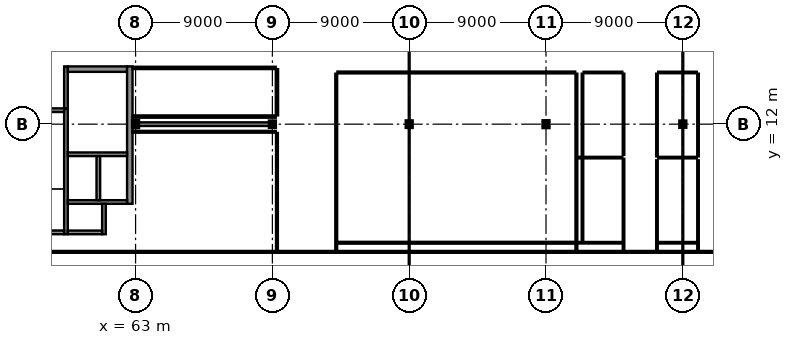
"""IFC4 building model, lengths in metres.
Left out: names, types, materials, properties, quantities, classifications, styles, units other than length and angle.
Written with IfcOpenShell. Run it as: python <this file> out.ifc"""

import sys

from ifc_helpers import new_model, si_unit, direction, frame, frame_2d, origin, origin_2d, place, context, subcontext, project, spatial, rectangle, i_section, extrude, element, fill, save


model = new_model("IFC4")
c1 = context("Model", 3, precision=1e-05, world=origin(), true_north=direction((0.0, 1.0)))
c2 = subcontext(c1, "Body", "Model", "MODEL_VIEW")
j1 = project(units=[si_unit("LENGTHUNIT", "METRE"), si_unit("PLANEANGLEUNIT", "RADIAN")], contexts=[c1])
p1 = place(None, origin())
s1 = spatial("IfcSite", under=j1, at=p1, CompositionType="ELEMENT")
p2 = place(p1, origin())
s2 = spatial("IfcBuilding", under=s1, at=p2, CompositionType="ELEMENT")
p3 = place(p2, frame((0.0, 0.0, 18.9)))
s3 = spatial("IfcBuildingStorey", under=s2, at=p3, CompositionType="ELEMENT", Elevation=18.9)
p4 = place(p3, frame((63.0, 12.0, 0.0), z_axis=(0.0, 0.0, 1.0), x_axis=(1.0, 0.0, 0.0)))
e1 = element("IfcColumn", 1, at=p4, inside=s3, PredefinedType="COLUMN", context=c2, shape_type="SweptSolid", body=[
    extrude(i_section(OverallWidth=0.3, OverallDepth=0.36, WebThickness=0.012, FlangeThickness=0.022, at=origin_2d()), origin(), (0.0, 0.0, 1.0), 4.5),
])
p5 = place(p3, frame((72.0, 12.0, 0.0), z_axis=(0.0, 0.0, 1.0), x_axis=(0.0, 1.0, 0.0)))
e2 = element("IfcColumn", 2, at=p5, inside=s3, PredefinedType="COLUMN", context=c2, shape_type="SweptSolid", body=[
    extrude(i_section(OverallWidth=0.3, OverallDepth=0.32, WebThickness=0.011, FlangeThickness=0.021, at=origin_2d()), origin(), (0.0, 0.0, 1.0), 4.5),
])
p6 = place(p3, frame((81.0, 12.0, 0.0), z_axis=(0.0, 0.0, 1.0), x_axis=(1.0, 0.0, 0.0)))
e3 = element("IfcColumn", 3, at=p6, inside=s3, PredefinedType="COLUMN", context=c2, shape_type="SweptSolid", body=[
    extrude(i_section(OverallWidth=0.3, OverallDepth=0.34, WebThickness=0.012, FlangeThickness=0.021, at=origin_2d()), origin(), (0.0, 0.0, 1.0), 4.5),
])
p7 = place(p3, frame((90.0, 12.0, 0.0), z_axis=(0.0, 0.0, 1.0), x_axis=(1.0, 0.0, 0.0)))
e4 = element("IfcColumn", 4, at=p7, inside=s3, PredefinedType="COLUMN", context=c2, shape_type="SweptSolid", body=[
    extrude(i_section(OverallWidth=0.3, OverallDepth=0.36, WebThickness=0.012, FlangeThickness=0.022, at=origin_2d()), origin(), (0.0, 0.0, 1.0), 4.5),
])
p8 = place(p3, frame((99.0, 12.0, 0.0), z_axis=(0.0, 0.0, 1.0), x_axis=(1.0, 0.0, 0.0)))
e5 = element("IfcColumn", 5, at=p8, inside=s3, PredefinedType="COLUMN", context=c2, shape_type="SweptSolid", body=[
    extrude(i_section(OverallWidth=0.3, OverallDepth=0.32, WebThickness=0.011, FlangeThickness=0.021, at=origin_2d()), origin(), (0.0, 0.0, 1.0), 4.5),
])
p9 = place(p3, frame((58.42, 4.76, 0.0), z_axis=(0.0, 0.0, 1.0), x_axis=(0.0, 1.0, 0.0)))
e6 = element("IfcWall", 6, at=p9, inside=s3, PredefinedType="SHEAR", context=c2, shape_type="SweptSolid", body=[
    extrude(rectangle(XDim=8.28, YDim=0.24, at=frame_2d((4.14, 0.0))), origin(), (0.0, 0.0, 1.0), 4.31),
])
p10 = place(p9, frame((6.49, 0.0, 0.0)))
e7 = element("IfcOpeningElement", 7, at=p10, cuts=e6, PredefinedType="OPENING", context=c2, shape_type="SweptSolid", body=[
    extrude(rectangle(XDim=1.3, YDim=2.2, at=frame_2d((0.65, 1.1))), frame((0.0, 0.135, 0.0), z_axis=(0.0, -1.0, 0.0), x_axis=(1.0, 0.0, 0.0)), (0.0, 0.0, 1.0), 0.27),
])
for number, where, z_axis, x_axis in (
    (8, (54.6, 4.88, 0.0), (0.0, 0.0, 1.0), (1.0, 0.0, 0.0)),
    (9, (54.6, 12.92, 0.0), (0.0, 0.0, 1.0), (1.0, 0.0, 0.0)),
):
    element("IfcWall", number, at=place(p3, frame(where, z_axis=z_axis, x_axis=x_axis)), inside=s3, PredefinedType="SHEAR", context=c2, shape_type="SweptSolid", body=[
        extrude(rectangle(XDim=3.7, YDim=0.24, at=frame_2d((1.85, 0.0))), origin(), (0.0, 0.0, 1.0), 4.31),
    ])
p11 = place(p3, frame((58.42, 13.04, 0.0), z_axis=(0.0, 0.0, 1.0), x_axis=(0.0, 1.0, 0.0)))
e10 = element("IfcWall", 10, at=p11, inside=s3, PredefinedType="SHEAR", context=c2, shape_type="SweptSolid", body=[
    extrude(rectangle(XDim=2.76, YDim=0.24, at=frame_2d((1.38, 0.0))), origin(), (0.0, 0.0, 1.0), 4.16),
])
p12 = place(p3, frame((58.54, 15.62, 0.0), z_axis=(0.0, 0.0, 1.0), x_axis=(1.0, 0.0, 0.0)))
e11 = element("IfcWall", 11, at=p12, inside=s3, PredefinedType="SHEAR", context=c2, shape_type="SweptSolid", body=[
    extrude(rectangle(XDim=3.9, YDim=0.36, at=frame_2d((1.95, 0.0))), origin(), (0.0, 0.0, 1.0), 4.16),
])
p13 = place(p12, frame((1.15, 0.0, 0.0)))
e12 = element("IfcOpeningElement", 12, at=p13, cuts=e11, PredefinedType="OPENING", context=c2, shape_type="SweptSolid", body=[
    extrude(rectangle(XDim=1.6, YDim=2.25, at=frame_2d((0.8, 1.125))), frame((0.0, 0.195, 0.0), z_axis=(0.0, -1.0, 0.0), x_axis=(1.0, 0.0, 0.0)), (0.0, 0.0, 1.0), 0.39),
])
p14 = place(p3, frame((62.62, 6.76, 0.0), z_axis=(0.0, 0.0, 1.0), x_axis=(0.0, 1.0, 0.0)))
e13 = element("IfcWall", 13, at=p14, inside=s3, PredefinedType="SHEAR", context=c2, shape_type="SweptSolid", body=[
    extrude(rectangle(XDim=9.04, YDim=0.36, at=frame_2d((4.52, 0.0))), origin(), (0.0, 0.0, 1.0), 4.16),
])
p15 = place(p3, frame((58.54, 10.02, 0.0), z_axis=(0.0, 0.0, 1.0), x_axis=(1.0, 0.0, 0.0)))
e14 = element("IfcWall", 14, at=p15, inside=s3, PredefinedType="SHEAR", context=c2, shape_type="SweptSolid", body=[
    extrude(rectangle(XDim=3.9, YDim=0.24, at=frame_2d((1.95, 0.0))), origin(), (0.0, 0.0, 1.0), 4.31),
])
p16 = place(p15, frame((0.235, 0.0, 0.0)))
e15 = element("IfcOpeningElement", 15, at=p16, cuts=e14, PredefinedType="OPENING", context=c2, shape_type="SweptSolid", body=[
    extrude(rectangle(XDim=1.6, YDim=2.3, at=frame_2d((0.8, 1.15))), frame((0.0, 0.135, 0.0), z_axis=(0.0, -1.0, 0.0), x_axis=(1.0, 0.0, 0.0)), (0.0, 0.0, 1.0), 0.27),
])
p17 = place(p15, frame((2.185, 0.0, 0.0)))
e16 = element("IfcOpeningElement", 16, at=p17, cuts=e14, PredefinedType="OPENING", context=c2, shape_type="SweptSolid", body=[
    extrude(rectangle(XDim=1.6, YDim=2.3, at=frame_2d((0.8, 1.15))), frame((0.0, 0.135, 0.0), z_axis=(0.0, -1.0, 0.0), x_axis=(1.0, 0.0, 0.0)), (0.0, 0.0, 1.0), 0.27),
])
p18 = place(p3, frame((58.54, 6.88, 0.0), z_axis=(0.0, 0.0, 1.0), x_axis=(1.0, 0.0, 0.0)))
e17 = element("IfcWall", 17, at=p18, inside=s3, PredefinedType="SHEAR", context=c2, shape_type="SweptSolid", body=[
    extrude(rectangle(XDim=3.9, YDim=0.24, at=frame_2d((1.95, 0.0))), origin(), (0.0, 0.0, 1.0), 4.31),
])
p19 = place(p3, frame((60.55, 7.0, 0.0), z_axis=(0.0, 0.0, 1.0), x_axis=(0.0, 1.0, 0.0)))
e18 = element("IfcWall", 18, at=p19, inside=s3, PredefinedType="SHEAR", context=c2, shape_type="SweptSolid", body=[
    extrude(rectangle(XDim=2.9, YDim=0.24, at=frame_2d((1.45, 0.0))), origin(), (0.0, 0.0, 1.0), 4.31),
])
p20 = place(p3, frame((60.92, 4.76, 0.0), z_axis=(0.0, 0.0, 1.0), x_axis=(0.0, 1.0, 0.0)))
e19 = element("IfcWall", 19, at=p20, inside=s3, PredefinedType="SHEAR", context=c2, shape_type="SweptSolid", body=[
    extrude(rectangle(XDim=2.0, YDim=0.24, at=frame_2d((1.0, 0.0))), origin(), (0.0, 0.0, 1.0), 4.31),
])
p21 = place(p3, frame((58.54, 4.88, 0.0), z_axis=(0.0, 0.0, 1.0), x_axis=(1.0, 0.0, 0.0)))
e20 = element("IfcWall", 20, at=p21, inside=s3, PredefinedType="SHEAR", context=c2, shape_type="SweptSolid", body=[
    extrude(rectangle(XDim=2.26, YDim=0.24, at=frame_2d((1.13, 0.0))), origin(), (0.0, 0.0, 1.0), 4.31),
])
p22 = place(p3, frame((63.008, 12.0, 0.0), z_axis=(0.0, 0.0, 1.0), x_axis=(1.0, 0.0, 0.0)))
e21 = element("IfcWall", 21, at=p22, inside=s3, PredefinedType="SHEAR", context=c2, shape_type="SweptSolid", body=[
    extrude(rectangle(XDim=8.834, YDim=0.24, at=frame_2d((4.417, 0.0))), origin(), (0.0, 0.0, 1.0), 3.355),
])
p23 = place(p3, frame((53.87, 3.6, 0.0), z_axis=(0.0, 0.0, 1.0), x_axis=(1.0, 0.0, 0.0)))
e22 = element("IfcWall", 22, at=p23, inside=s3, PredefinedType="PARTITIONING", context=c2, shape_type="SweptSolid", body=[
    extrude(rectangle(XDim=63.25, YDim=0.12, at=frame_2d((31.625, 0.0))), origin(), (0.0, 0.0, 1.0), 4.14),
])
p24 = place(p23, frame((19.855, 0.0, 0.0)))
e23 = element("IfcOpeningElement", 23, at=p24, cuts=e22, PredefinedType="OPENING", context=c2, shape_type="SweptSolid", body=[
    extrude(rectangle(XDim=0.95, YDim=2.15, at=frame_2d((0.475, 1.075))), frame((0.0, 0.075, 0.0), z_axis=(0.0, -1.0, 0.0), x_axis=(1.0, 0.0, 0.0)), (0.0, 0.0, 1.0), 0.15),
])
p25 = place(p3, frame((72.3, 11.42, 0.0), z_axis=(0.0, 0.0, 1.0), x_axis=(0.0, -1.0, 0.0)))
e24 = element("IfcWall", 24, at=p25, inside=s3, PredefinedType="PARTITIONING", context=c2, shape_type="SweptSolid", body=[
    extrude(rectangle(XDim=7.765, YDim=0.12, at=frame_2d((3.882, 0.0))), origin(), (0.0, 0.0, 1.0), 4.14),
])
p26 = place(p25, frame((3.433, 0.0, 0.0)))
e25 = element("IfcOpeningElement", 25, at=p26, cuts=e24, PredefinedType="OPENING", context=c2, shape_type="SweptSolid", body=[
    extrude(rectangle(XDim=0.9, YDim=2.1, at=frame_2d((0.45, 1.05))), frame((0.0, 0.075, 0.0), z_axis=(0.0, -1.0, 0.0), x_axis=(1.0, 0.0, 0.0)), (0.0, 0.0, 1.0), 0.15),
])
p27 = place(p3, frame((62.795, 11.5, 0.0), z_axis=(0.0, 0.0, 1.0), x_axis=(1.0, 0.0, 0.0)))
e26 = element("IfcWall", 26, at=p27, inside=s3, PredefinedType="PARTITIONING", context=c2, shape_type="SweptSolid", body=[
    extrude(rectangle(XDim=9.425, YDim=0.12, at=frame_2d((4.712, 0.0))), origin(), (0.0, 0.0, 1.0), 4.14),
])
p28 = place(p3, frame((62.795, 15.7, 0.0), z_axis=(0.0, 0.0, 1.0), x_axis=(1.0, 0.0, 0.0)))
e27 = element("IfcWall", 27, at=p28, inside=s3, PredefinedType="PARTITIONING", context=c2, shape_type="SweptSolid", body=[
    extrude(rectangle(XDim=9.425, YDim=0.15, at=frame_2d((4.712, 0.0))), origin(), (0.0, 0.0, 1.0), 4.14),
])
p29 = place(p28, frame((4.187, 0.0, 0.0)))
e28 = element("IfcOpeningElement", 28, at=p29, cuts=e27, PredefinedType="OPENING", context=c2, shape_type="SweptSolid", body=[
    extrude(rectangle(XDim=1.05, YDim=2.25, at=frame_2d((0.525, 1.125))), frame((0.0, 0.09, 0.0), z_axis=(0.0, -1.0, 0.0), x_axis=(1.0, 0.0, 0.0)), (0.0, 0.0, 1.0), 0.18),
])
p30 = place(p3, frame((72.3, 15.62, 0.0), z_axis=(0.0, 0.0, 1.0), x_axis=(0.0, -1.0, 0.0)))
e29 = element("IfcWall", 29, at=p30, inside=s3, PredefinedType="PARTITIONING", context=c2, shape_type="SweptSolid", body=[
    extrude(rectangle(XDim=3.04, YDim=0.15, at=frame_2d((1.52, 0.0))), origin(), (0.0, 0.0, 1.0), 4.14),
])
p31 = place(p3, frame((72.22, 12.5, 0.0), z_axis=(0.0, 0.0, 1.0), x_axis=(-1.0, 0.0, 0.0)))
e30 = element("IfcWall", 30, at=p31, inside=s3, PredefinedType="PARTITIONING", context=c2, shape_type="SweptSolid", body=[
    extrude(rectangle(XDim=9.425, YDim=0.15, at=frame_2d((4.712, 0.0))), origin(), (0.0, 0.0, 1.0), 4.14),
])
p32 = place(p3, frame((76.2, 3.655, 0.0), z_axis=(0.0, 0.0, 1.0), x_axis=(0.0, 1.0, 0.0)))
e31 = element("IfcWall", 31, at=p32, inside=s3, PredefinedType="PARTITIONING", context=c2, shape_type="SweptSolid", body=[
    extrude(rectangle(XDim=11.665, YDim=0.12, at=frame_2d((5.833, 0.0))), origin(), (0.0, 0.0, 1.0), 4.14),
])
p33 = place(p3, frame((76.28, 15.4, 0.0), z_axis=(0.0, 0.0, 1.0), x_axis=(1.0, 0.0, 0.0)))
e32 = element("IfcWall", 32, at=p33, inside=s3, PredefinedType="PARTITIONING", context=c2, shape_type="SweptSolid", body=[
    extrude(rectangle(XDim=15.64, YDim=0.12, at=frame_2d((7.82, 0.0))), origin(), (0.0, 0.0, 1.0), 4.14),
])
p34 = place(p33, frame((7.345, 0.0, 0.0)))
e33 = element("IfcOpeningElement", 33, at=p34, cuts=e32, PredefinedType="OPENING", context=c2, shape_type="SweptSolid", body=[
    extrude(rectangle(XDim=0.95, YDim=2.15, at=frame_2d((0.475, 1.075))), frame((0.0, 0.075, 0.0), z_axis=(0.0, -1.0, 0.0), x_axis=(1.0, 0.0, 0.0)), (0.0, 0.0, 1.0), 0.15),
])
p35 = place(p3, frame((92.0, 15.32, 0.0), z_axis=(0.0, 0.0, 1.0), x_axis=(0.0, -1.0, 0.0)))
e34 = element("IfcWall", 34, at=p35, inside=s3, PredefinedType="PARTITIONING", context=c2, shape_type="SweptSolid", body=[
    extrude(rectangle(XDim=11.665, YDim=0.12, at=frame_2d((5.833, 0.0))), origin(), (0.0, 0.0, 1.0), 4.14),
])
p36 = place(p3, frame((91.945, 4.2, 0.0), z_axis=(0.0, 0.0, 1.0), x_axis=(-1.0, 0.0, 0.0)))
e35 = element("IfcWall", 35, at=p36, inside=s3, PredefinedType="PARTITIONING", context=c2, shape_type="SweptSolid", body=[
    extrude(rectangle(XDim=15.69, YDim=0.12, at=frame_2d((7.845, 0.0))), origin(), (0.0, 0.0, 1.0), 4.14),
])
p37 = place(p3, frame((92.055, 9.8, 0.0), z_axis=(0.0, 0.0, 1.0), x_axis=(1.0, 0.0, 0.0)))
e36 = element("IfcWall", 36, at=p37, inside=s3, PredefinedType="PARTITIONING", context=c2, shape_type="SweptSolid", body=[
    extrude(rectangle(XDim=2.965, YDim=0.1, at=frame_2d((1.482, 0.0))), origin(), (0.0, 0.0, 1.0), 4.14),
])
p38 = place(p3, frame((95.1, 9.72, 0.0), z_axis=(0.0, 0.0, 1.0), x_axis=(0.0, -1.0, 0.0)))
e37 = element("IfcWall", 37, at=p38, inside=s3, PredefinedType="PARTITIONING", context=c2, shape_type="SweptSolid", body=[
    extrude(rectangle(XDim=6.065, YDim=0.1, at=frame_2d((3.032, 0.0))), origin(), (0.0, 0.0, 1.0), 4.14),
])
p39 = place(p38, frame((2.529, 0.0, 0.0)))
e38 = element("IfcOpeningElement", 38, at=p39, cuts=e37, PredefinedType="OPENING", context=c2, shape_type="SweptSolid", body=[
    extrude(rectangle(XDim=0.9, YDim=2.05, at=frame_2d((0.45, 1.025))), frame((0.0, 0.065, 0.0), z_axis=(0.0, -1.0, 0.0), x_axis=(1.0, 0.0, 0.0)), (0.0, 0.0, 1.0), 0.13),
])
p40 = place(p3, frame((95.055, 4.2, 0.0), z_axis=(0.0, 0.0, 1.0), x_axis=(-1.0, 0.0, 0.0)))
e39 = element("IfcWall", 39, at=p40, inside=s3, PredefinedType="PARTITIONING", context=c2, shape_type="SweptSolid", body=[
    extrude(rectangle(XDim=3.0, YDim=0.1, at=frame_2d((1.5, 0.0))), origin(), (0.0, 0.0, 1.0), 4.14),
])
p41 = place(p3, frame((92.4, 4.245, 0.0), z_axis=(0.0, 0.0, 1.0), x_axis=(0.0, 1.0, 0.0)))
e40 = element("IfcWall", 40, at=p41, inside=s3, PredefinedType="PARTITIONING", context=c2, shape_type="SweptSolid", body=[
    extrude(rectangle(XDim=5.51, YDim=0.1, at=frame_2d((2.755, 0.0))), origin(), (0.0, 0.0, 1.0), 4.14),
])
p42 = place(p3, frame((95.1, 15.32, 0.0), z_axis=(0.0, 0.0, 1.0), x_axis=(0.0, -1.0, 0.0)))
e41 = element("IfcWall", 41, at=p42, inside=s3, PredefinedType="PARTITIONING", context=c2, shape_type="SweptSolid", body=[
    extrude(rectangle(XDim=5.34, YDim=0.1, at=frame_2d((2.67, 0.0))), origin(), (0.0, 0.0, 1.0), 4.14),
])
p43 = place(p42, frame((2.22, 0.0, 0.0)))
e42 = element("IfcOpeningElement", 42, at=p43, cuts=e41, PredefinedType="OPENING", context=c2, shape_type="SweptSolid", body=[
    extrude(rectangle(XDim=0.9, YDim=2.05, at=frame_2d((0.45, 1.025))), frame((0.0, 0.065, 0.0), z_axis=(0.0, -1.0, 0.0), x_axis=(1.0, 0.0, 0.0)), (0.0, 0.0, 1.0), 0.13),
])
p44 = place(p3, frame((92.4, 9.845, 0.0), z_axis=(0.0, 0.0, 1.0), x_axis=(0.0, 1.0, 0.0)))
e43 = element("IfcWall", 43, at=p44, inside=s3, PredefinedType="PARTITIONING", context=c2, shape_type="SweptSolid", body=[
    extrude(rectangle(XDim=5.475, YDim=0.1, at=frame_2d((2.738, 0.0))), origin(), (0.0, 0.0, 1.0), 4.14),
])
for number, where, z_axis, x_axis in (
    (44, (92.48, 15.4, 0.0), (0.0, 0.0, 1.0), (1.0, 0.0, 0.0)),
    (45, (99.92, 9.8, 0.0), (0.0, 0.0, 1.0), (-1.0, 0.0, 0.0)),
):
    element("IfcWall", number, at=place(p3, frame(where, z_axis=z_axis, x_axis=x_axis)), inside=s3, PredefinedType="PARTITIONING", context=c2, shape_type="SweptSolid", body=[
        extrude(rectangle(XDim=2.54, YDim=0.1, at=frame_2d((1.27, 0.0))), origin(), (0.0, 0.0, 1.0), 4.14),
    ])
p45 = place(p3, frame((97.3, 9.88, 0.0), z_axis=(0.0, 0.0, 1.0), x_axis=(0.0, 1.0, 0.0)))
e46 = element("IfcWall", 46, at=p45, inside=s3, PredefinedType="PARTITIONING", context=c2, shape_type="SweptSolid", body=[
    extrude(rectangle(XDim=5.44, YDim=0.1, at=frame_2d((2.72, 0.0))), origin(), (0.0, 0.0, 1.0), 4.14),
])
p46 = place(p45, frame((2.22, 0.0, 0.0)))
e47 = element("IfcOpeningElement", 47, at=p46, cuts=e46, PredefinedType="OPENING", context=c2, shape_type="SweptSolid", body=[
    extrude(rectangle(XDim=1.0, YDim=2.1, at=frame_2d((0.5, 1.05))), frame((0.0, 0.065, 0.0), z_axis=(0.0, -1.0, 0.0), x_axis=(1.0, 0.0, 0.0)), (0.0, 0.0, 1.0), 0.13),
])
p47 = place(p3, frame((97.38, 15.4, 0.0), z_axis=(0.0, 0.0, 1.0), x_axis=(1.0, 0.0, 0.0)))
e48 = element("IfcWall", 48, at=p47, inside=s3, PredefinedType="PARTITIONING", context=c2, shape_type="SweptSolid", body=[
    extrude(rectangle(XDim=2.54, YDim=0.1, at=frame_2d((1.27, 0.0))), origin(), (0.0, 0.0, 1.0), 4.14),
])
p48 = place(p3, frame((100.0, 15.32, 0.0), z_axis=(0.0, 0.0, 1.0), x_axis=(0.0, -1.0, 0.0)))
e49 = element("IfcWall", 49, at=p48, inside=s3, PredefinedType="PARTITIONING", context=c2, shape_type="SweptSolid", body=[
    extrude(rectangle(XDim=5.44, YDim=0.1, at=frame_2d((2.72, 0.0))), origin(), (0.0, 0.0, 1.0), 4.14),
])
p49 = place(p3, frame((97.3, 3.655, 0.0), z_axis=(0.0, 0.0, 1.0), x_axis=(0.0, 1.0, 0.0)))
e50 = element("IfcWall", 50, at=p49, inside=s3, PredefinedType="PARTITIONING", context=c2, shape_type="SweptSolid", body=[
    extrude(rectangle(XDim=5.965, YDim=0.1, at=frame_2d((2.982, 0.0))), origin(), (0.0, 0.0, 1.0), 4.14),
])
p50 = place(p49, frame((2.586, 0.0, 0.0)))
e51 = element("IfcOpeningElement", 51, at=p50, cuts=e50, PredefinedType="OPENING", context=c2, shape_type="SweptSolid", body=[
    extrude(rectangle(XDim=0.9, YDim=2.05, at=frame_2d((0.45, 1.025))), frame((0.0, 0.065, 0.0), z_axis=(0.0, -1.0, 0.0), x_axis=(1.0, 0.0, 0.0)), (0.0, 0.0, 1.0), 0.13),
])
p51 = place(p3, frame((100.0, 9.62, 0.0), z_axis=(0.0, 0.0, 1.0), x_axis=(0.0, -1.0, 0.0)))
e52 = element("IfcWall", 52, at=p51, inside=s3, PredefinedType="PARTITIONING", context=c2, shape_type="SweptSolid", body=[
    extrude(rectangle(XDim=5.965, YDim=0.1, at=frame_2d((2.982, 0.0))), origin(), (0.0, 0.0, 1.0), 4.14),
])
p52 = place(p3, frame((99.955, 4.2, 0.0), z_axis=(0.0, 0.0, 1.0), x_axis=(-1.0, 0.0, 0.0)))
e53 = element("IfcWall", 53, at=p52, inside=s3, PredefinedType="PARTITIONING", context=c2, shape_type="SweptSolid", body=[
    extrude(rectangle(XDim=2.61, YDim=0.1, at=frame_2d((1.305, 0.0))), origin(), (0.0, 0.0, 1.0), 4.14),
])
p53 = place(p10, frame((1.3, 0.0, 0.0), z_axis=(0.0, 0.0, 1.0), x_axis=(-1.0, 0.0, 0.0)))
e54 = element("IfcDoor", 54, at=p53, inside=s3, OperationType="SINGLE_SWING_RIGHT", PredefinedType="DOOR", context=c2, shape_type="SweptSolid", body=[
    extrude(rectangle(XDim=1.3, YDim=2.2, at=frame_2d((0.65, 1.1))), frame((0.0, 0.025, 0.0), z_axis=(0.0, -1.0, 0.0), x_axis=(1.0, 0.0, 0.0)), (0.0, 0.0, 1.0), 0.05),
])
fill(e7, e54)
p54 = place(p13, origin())
e55 = element("IfcDoor", 55, at=p54, inside=s3, OperationType="DOUBLE_DOOR_SINGLE_SWING", PredefinedType="DOOR", context=c2, shape_type="SweptSolid", body=[
    extrude(rectangle(XDim=1.6, YDim=2.25, at=frame_2d((0.8, 1.125))), frame((0.0, 0.025, 0.0), z_axis=(0.0, -1.0, 0.0), x_axis=(1.0, 0.0, 0.0)), (0.0, 0.0, 1.0), 0.05),
])
fill(e12, e55)
p55 = place(p16, origin())
e56 = element("IfcDoor", 56, at=p55, inside=s3, OperationType="DOUBLE_DOOR_SLIDING", PredefinedType="DOOR", context=c2, shape_type="SweptSolid", body=[
    extrude(rectangle(XDim=1.6, YDim=2.3, at=frame_2d((0.8, 1.15))), frame((0.0, 0.025, 0.0), z_axis=(0.0, -1.0, 0.0), x_axis=(1.0, 0.0, 0.0)), (0.0, 0.0, 1.0), 0.05),
])
fill(e15, e56)
p56 = place(p17, origin())
e57 = element("IfcDoor", 57, at=p56, inside=s3, OperationType="DOUBLE_DOOR_SLIDING", PredefinedType="DOOR", context=c2, shape_type="SweptSolid", body=[
    extrude(rectangle(XDim=1.6, YDim=2.3, at=frame_2d((0.8, 1.15))), frame((0.0, 0.025, 0.0), z_axis=(0.0, -1.0, 0.0), x_axis=(1.0, 0.0, 0.0)), (0.0, 0.0, 1.0), 0.05),
])
fill(e16, e57)
p57 = place(p24, frame((0.95, 0.0, 0.0), z_axis=(0.0, 0.0, 1.0), x_axis=(-1.0, 0.0, 0.0)))
e58 = element("IfcDoor", 58, at=p57, inside=s3, OperationType="SINGLE_SWING_LEFT", PredefinedType="DOOR", context=c2, shape_type="SweptSolid", body=[
    extrude(rectangle(XDim=0.95, YDim=2.15, at=frame_2d((0.475, 1.075))), frame((0.0, 0.025, 0.0), z_axis=(0.0, -1.0, 0.0), x_axis=(1.0, 0.0, 0.0)), (0.0, 0.0, 1.0), 0.05),
])
fill(e23, e58)
p58 = place(p26, origin())
e59 = element("IfcDoor", 59, at=p58, inside=s3, OperationType="SINGLE_SWING_LEFT", PredefinedType="DOOR", context=c2, shape_type="SweptSolid", body=[
    extrude(rectangle(XDim=0.9, YDim=2.1, at=frame_2d((0.45, 1.05))), frame((0.0, 0.025, 0.0), z_axis=(0.0, -1.0, 0.0), x_axis=(1.0, 0.0, 0.0)), (0.0, 0.0, 1.0), 0.05),
])
fill(e25, e59)
p59 = place(p29, frame((1.05, 0.0, 0.0), z_axis=(0.0, 0.0, 1.0), x_axis=(-1.0, 0.0, 0.0)))
e60 = element("IfcDoor", 60, at=p59, inside=s3, OperationType="SINGLE_SWING_RIGHT", PredefinedType="DOOR", context=c2, shape_type="SweptSolid", body=[
    extrude(rectangle(XDim=1.05, YDim=2.25, at=frame_2d((0.525, 1.125))), frame((0.0, 0.025, 0.0), z_axis=(0.0, -1.0, 0.0), x_axis=(1.0, 0.0, 0.0)), (0.0, 0.0, 1.0), 0.05),
])
fill(e28, e60)
p60 = place(p34, origin())
e61 = element("IfcDoor", 61, at=p60, inside=s3, OperationType="SINGLE_SWING_LEFT", PredefinedType="DOOR", context=c2, shape_type="SweptSolid", body=[
    extrude(rectangle(XDim=0.95, YDim=2.15, at=frame_2d((0.475, 1.075))), frame((0.0, 0.025, 0.0), z_axis=(0.0, -1.0, 0.0), x_axis=(1.0, 0.0, 0.0)), (0.0, 0.0, 1.0), 0.05),
])
fill(e33, e61)
p61 = place(p39, origin())
e62 = element("IfcDoor", 62, at=p61, inside=s3, OperationType="SINGLE_SWING_LEFT", PredefinedType="DOOR", context=c2, shape_type="SweptSolid", body=[
    extrude(rectangle(XDim=0.9, YDim=2.05, at=frame_2d((0.45, 1.025))), frame((0.0, 0.025, 0.0), z_axis=(0.0, -1.0, 0.0), x_axis=(1.0, 0.0, 0.0)), (0.0, 0.0, 1.0), 0.05),
])
fill(e38, e62)
p62 = place(p43, frame((0.9, 0.0, 0.0), z_axis=(0.0, 0.0, 1.0), x_axis=(-1.0, 0.0, 0.0)))
e63 = element("IfcDoor", 63, at=p62, inside=s3, OperationType="SINGLE_SWING_RIGHT", PredefinedType="DOOR", context=c2, shape_type="SweptSolid", body=[
    extrude(rectangle(XDim=0.9, YDim=2.05, at=frame_2d((0.45, 1.025))), frame((0.0, 0.025, 0.0), z_axis=(0.0, -1.0, 0.0), x_axis=(1.0, 0.0, 0.0)), (0.0, 0.0, 1.0), 0.05),
])
fill(e42, e63)
p63 = place(p46, origin())
e64 = element("IfcDoor", 64, at=p63, inside=s3, OperationType="SINGLE_SWING_LEFT", PredefinedType="DOOR", context=c2, shape_type="SweptSolid", body=[
    extrude(rectangle(XDim=1.0, YDim=2.1, at=frame_2d((0.5, 1.05))), frame((0.0, 0.025, 0.0), z_axis=(0.0, -1.0, 0.0), x_axis=(1.0, 0.0, 0.0)), (0.0, 0.0, 1.0), 0.05),
])
fill(e47, e64)
p64 = place(p50, frame((0.9, 0.0, 0.0), z_axis=(0.0, 0.0, 1.0), x_axis=(-1.0, 0.0, 0.0)))
e65 = element("IfcDoor", 65, at=p64, inside=s3, OperationType="SINGLE_SWING_RIGHT", PredefinedType="DOOR", context=c2, shape_type="SweptSolid", body=[
    extrude(rectangle(XDim=0.9, YDim=2.05, at=frame_2d((0.45, 1.025))), frame((0.0, 0.025, 0.0), z_axis=(0.0, -1.0, 0.0), x_axis=(1.0, 0.0, 0.0)), (0.0, 0.0, 1.0), 0.05),
])
fill(e51, e65)
save(model, sys.argv[1])
